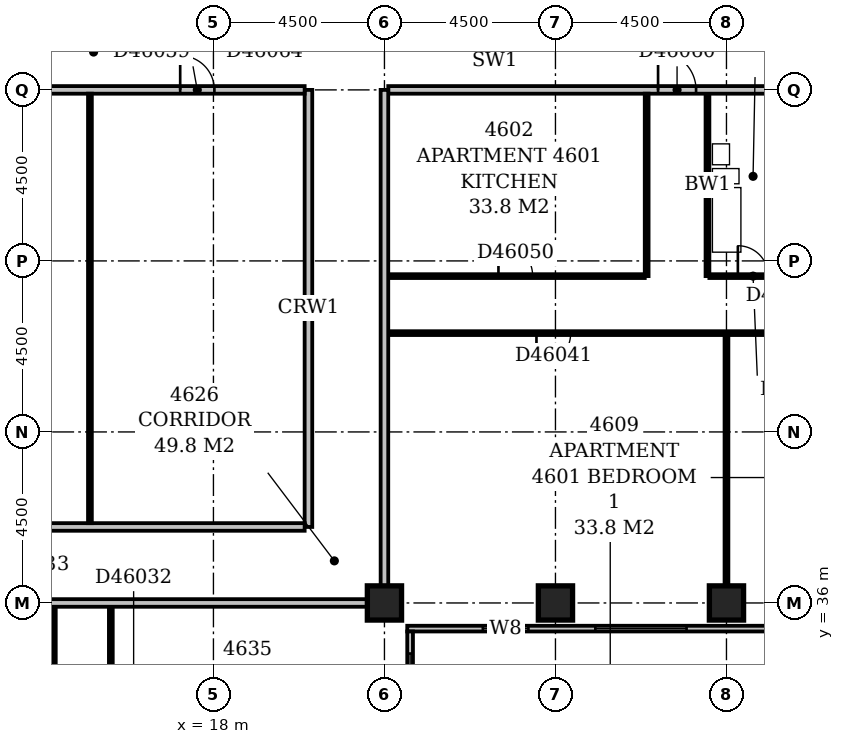
"""IFC4 building model, lengths in metres.
Left out: names, types, materials, properties, quantities, classifications, styles, units other than length and angle.
Written with IfcOpenShell. Run it as: python <this file> out.ifc"""

import sys

from ifc_helpers import new_model, si_unit, direction, frame, frame_2d, origin, origin_2d, place, context, subcontext, project, spatial, rectangle, extrude, element, fill, save


model = new_model("IFC4")
c1 = context("Model", 3, precision=1e-05, world=origin(), true_north=direction((0.0, 1.0)))
c2 = subcontext(c1, "Body", "Model", "MODEL_VIEW")
j1 = project(units=[si_unit("LENGTHUNIT", "METRE"), si_unit("PLANEANGLEUNIT", "RADIAN")], contexts=[c1])
p1 = place(None, origin())
s1 = spatial("IfcSite", under=j1, at=p1, CompositionType="ELEMENT")
p2 = place(p1, origin())
s2 = spatial("IfcBuilding", under=s1, at=p2, CompositionType="ELEMENT")
p3 = place(p2, frame((0.0, 0.0, 182.6)))
s3 = spatial("IfcBuildingStorey", under=s2, at=p3, CompositionType="ELEMENT", Elevation=182.6)
for number, where, z_axis, x_axis in (
    (1, (22.5, 36.0, -0.3), (0.0, 0.0, 1.0), (1.0, 0.0, 0.0)),
    (2, (27.0, 36.0, -0.3), (0.0, 0.0, 1.0), (1.0, 0.0, 0.0)),
    (3, (31.5, 36.0, -0.3), (0.0, 0.0, 1.0), (1.0, 0.0, 0.0)),
):
    element("IfcColumn", number, at=place(p3, frame(where, z_axis=z_axis, x_axis=x_axis)), inside=s3, PredefinedType="COLUMN", context=c2, shape_type="SweptSolid", body=[
        extrude(rectangle(XDim=0.9, YDim=0.9, at=origin_2d()), origin(), (0.0, 0.0, 1.0), 3.55),
    ])
p4 = place(p3, frame((23.175, 17.4, 0.0), z_axis=(0.0, 0.0, 1.0), x_axis=(0.0, 1.0, 0.0)))
e4 = element("IfcWall", 4, at=p4, inside=s3, PredefinedType="STANDARD", context=c2, shape_type="SweptSolid", body=[
    extrude(rectangle(XDim=17.85, YDim=0.15, at=frame_2d((8.925, 0.0))), origin(), (0.0, 0.0, 1.0), 2.7),
])
p5 = place(p4, frame((2.802, 0.0, 0.6)))
e5 = element("IfcOpeningElement", 5, at=p5, cuts=e4, PredefinedType="OPENING", context=c2, shape_type="SweptSolid", body=[
    extrude(rectangle(XDim=1.5, YDim=1.8, at=frame_2d((0.75, 0.9))), frame((0.0, 0.087, 0.0), z_axis=(0.0, -1.0, 0.0), x_axis=(1.0, 0.0, 0.0)), (0.0, 0.0, 1.0), 0.174),
])
p6 = place(p4, frame((6.15, 0.0, 0.6)))
e6 = element("IfcOpeningElement", 6, at=p6, cuts=e4, PredefinedType="OPENING", context=c2, shape_type="SweptSolid", body=[
    extrude(rectangle(XDim=2.4, YDim=1.8, at=frame_2d((1.2, 0.9))), frame((0.0, 0.087, 0.0), z_axis=(0.0, -1.0, 0.0), x_axis=(1.0, 0.0, 0.0)), (0.0, 0.0, 1.0), 0.174),
])
p7 = place(p4, frame((10.65, 0.0, 0.6)))
e7 = element("IfcOpeningElement", 7, at=p7, cuts=e4, PredefinedType="OPENING", context=c2, shape_type="SweptSolid", body=[
    extrude(rectangle(XDim=2.4, YDim=1.8, at=frame_2d((1.2, 0.9))), frame((0.0, 0.087, 0.0), z_axis=(0.0, -1.0, 0.0), x_axis=(1.0, 0.0, 0.0)), (0.0, 0.0, 1.0), 0.174),
])
p8 = place(p4, frame((14.869, 0.0, 0.6)))
e8 = element("IfcOpeningElement", 8, at=p8, cuts=e4, PredefinedType="OPENING", context=c2, shape_type="SweptSolid", body=[
    extrude(rectangle(XDim=2.4, YDim=1.8, at=frame_2d((1.2, 0.9))), frame((0.0, 0.087, 0.0), z_axis=(0.0, -1.0, 0.0), x_axis=(1.0, 0.0, 0.0)), (0.0, 0.0, 1.0), 0.174),
])
p9 = place(p3, frame((23.1, 35.325, 0.0), z_axis=(0.0, 0.0, 1.0), x_axis=(1.0, 0.0, 0.0)))
e9 = element("IfcWall", 9, at=p9, inside=s3, PredefinedType="STANDARD", context=c2, shape_type="SweptSolid", body=[
    extrude(rectangle(XDim=45.15, YDim=0.15, at=frame_2d((22.575, 0.0))), origin(), (0.0, 0.0, 1.0), 2.7),
])
p10 = place(p9, frame((1.989, 0.0, 0.6)))
e10 = element("IfcOpeningElement", 10, at=p10, cuts=e9, PredefinedType="OPENING", context=c2, shape_type="SweptSolid", body=[
    extrude(rectangle(XDim=1.2, YDim=1.8, at=frame_2d((0.6, 0.9))), frame((0.0, 0.087, 0.0), z_axis=(0.0, -1.0, 0.0), x_axis=(1.0, 0.0, 0.0)), (0.0, 0.0, 1.0), 0.174),
])
p11 = place(p9, frame((4.95, 0.0, 0.6)))
e11 = element("IfcOpeningElement", 11, at=p11, cuts=e9, PredefinedType="OPENING", context=c2, shape_type="SweptSolid", body=[
    extrude(rectangle(XDim=2.4, YDim=1.8, at=frame_2d((1.2, 0.9))), frame((0.0, 0.087, 0.0), z_axis=(0.0, -1.0, 0.0), x_axis=(1.0, 0.0, 0.0)), (0.0, 0.0, 1.0), 0.174),
])
p12 = place(p9, frame((9.45, 0.0, 0.6)))
e12 = element("IfcOpeningElement", 12, at=p12, cuts=e9, PredefinedType="OPENING", context=c2, shape_type="SweptSolid", body=[
    extrude(rectangle(XDim=2.4, YDim=1.8, at=frame_2d((1.2, 0.9))), frame((0.0, 0.087, 0.0), z_axis=(0.0, -1.0, 0.0), x_axis=(1.0, 0.0, 0.0)), (0.0, 0.0, 1.0), 0.174),
])
p13 = place(p9, frame((13.95, 0.0, 0.6)))
e13 = element("IfcOpeningElement", 13, at=p13, cuts=e9, PredefinedType="OPENING", context=c2, shape_type="SweptSolid", body=[
    extrude(rectangle(XDim=2.4, YDim=1.8, at=frame_2d((1.2, 0.9))), frame((0.0, 0.087, 0.0), z_axis=(0.0, -1.0, 0.0), x_axis=(1.0, 0.0, 0.0)), (0.0, 0.0, 1.0), 0.174),
])
p14 = place(p9, frame((18.45, 0.0, 0.6)))
e14 = element("IfcOpeningElement", 14, at=p14, cuts=e9, PredefinedType="OPENING", context=c2, shape_type="SweptSolid", body=[
    extrude(rectangle(XDim=2.4, YDim=1.8, at=frame_2d((1.2, 0.9))), frame((0.0, 0.087, 0.0), z_axis=(0.0, -1.0, 0.0), x_axis=(1.0, 0.0, 0.0)), (0.0, 0.0, 1.0), 0.174),
])
p15 = place(p9, frame((22.589, 0.0, 0.6)))
e15 = element("IfcOpeningElement", 15, at=p15, cuts=e9, PredefinedType="OPENING", context=c2, shape_type="SweptSolid", body=[
    extrude(rectangle(XDim=2.1, YDim=1.8, at=frame_2d((1.05, 0.9))), frame((0.0, 0.087, 0.0), z_axis=(0.0, -1.0, 0.0), x_axis=(1.0, 0.0, 0.0)), (0.0, 0.0, 1.0), 0.174),
])
p16 = place(p9, frame((28.653, 0.0, 0.6)))
e16 = element("IfcOpeningElement", 16, at=p16, cuts=e9, PredefinedType="OPENING", context=c2, shape_type="SweptSolid", body=[
    extrude(rectangle(XDim=1.5, YDim=1.8, at=frame_2d((0.75, 0.9))), frame((0.0, 0.087, 0.0), z_axis=(0.0, -1.0, 0.0), x_axis=(1.0, 0.0, 0.0)), (0.0, 0.0, 1.0), 0.174),
])
p17 = place(p9, frame((31.95, 0.0, 0.6)))
e17 = element("IfcOpeningElement", 17, at=p17, cuts=e9, PredefinedType="OPENING", context=c2, shape_type="SweptSolid", body=[
    extrude(rectangle(XDim=2.4, YDim=1.8, at=frame_2d((1.2, 0.9))), frame((0.0, 0.087, 0.0), z_axis=(0.0, -1.0, 0.0), x_axis=(1.0, 0.0, 0.0)), (0.0, 0.0, 1.0), 0.174),
])
p18 = place(p9, frame((36.45, 0.0, 0.6)))
e18 = element("IfcOpeningElement", 18, at=p18, cuts=e9, PredefinedType="OPENING", context=c2, shape_type="SweptSolid", body=[
    extrude(rectangle(XDim=2.4, YDim=1.8, at=frame_2d((1.2, 0.9))), frame((0.0, 0.087, 0.0), z_axis=(0.0, -1.0, 0.0), x_axis=(1.0, 0.0, 0.0)), (0.0, 0.0, 1.0), 0.174),
])
p19 = place(p9, frame((40.95, 0.0, 0.6)))
e19 = element("IfcOpeningElement", 19, at=p19, cuts=e9, PredefinedType="OPENING", context=c2, shape_type="SweptSolid", body=[
    extrude(rectangle(XDim=2.4, YDim=1.8, at=frame_2d((1.2, 0.9))), frame((0.0, 0.087, 0.0), z_axis=(0.0, -1.0, 0.0), x_axis=(1.0, 0.0, 0.0)), (0.0, 0.0, 1.0), 0.174),
])
p20 = place(p3, frame((15.3, 22.6, 0.0), z_axis=(0.0, 0.0, 1.0), x_axis=(0.0, 1.0, 0.0)))
e20 = element("IfcWall", 20, at=p20, inside=s3, PredefinedType="PARTITIONING", context=c2, shape_type="SweptSolid", body=[
    extrude(rectangle(XDim=13.3, YDim=0.1, at=frame_2d((6.65, 0.0))), origin(), (0.0, 0.0, 1.0), 3.25),
])
p21 = place(p20, frame((1.7, 0.0, 0.0)))
e21 = element("IfcOpeningElement", 21, at=p21, cuts=e20, PredefinedType="OPENING", context=c2, shape_type="SweptSolid", body=[
    extrude(rectangle(XDim=0.9, YDim=2.1, at=frame_2d((0.45, 1.05))), frame((0.0, 0.062, 0.0), z_axis=(0.0, -1.0, 0.0), x_axis=(1.0, 0.0, 0.0)), (0.0, 0.0, 1.0), 0.124),
])
p22 = place(p20, frame((6.2, 0.0, 0.0)))
e22 = element("IfcOpeningElement", 22, at=p22, cuts=e20, PredefinedType="OPENING", context=c2, shape_type="SweptSolid", body=[
    extrude(rectangle(XDim=0.9, YDim=2.1, at=frame_2d((0.45, 1.05))), frame((0.0, 0.062, 0.0), z_axis=(0.0, -1.0, 0.0), x_axis=(1.0, 0.0, 0.0)), (0.0, 0.0, 1.0), 0.124),
])
p23 = place(p20, frame((10.7, 0.0, 0.0)))
e23 = element("IfcOpeningElement", 23, at=p23, cuts=e20, PredefinedType="OPENING", context=c2, shape_type="SweptSolid", body=[
    extrude(rectangle(XDim=0.9, YDim=2.1, at=frame_2d((0.45, 1.05))), frame((0.0, 0.062, 0.0), z_axis=(0.0, -1.0, 0.0), x_axis=(1.0, 0.0, 0.0)), (0.0, 0.0, 1.0), 0.124),
])
p24 = place(p3, frame((13.8, 24.1, 0.0), z_axis=(0.0, 0.0, 1.0), x_axis=(0.0, 1.0, 0.0)))
e24 = element("IfcWall", 24, at=p24, inside=s3, PredefinedType="PARTITIONING", context=c2, shape_type="SweptSolid", body=[
    extrude(rectangle(XDim=11.8, YDim=0.1, at=frame_2d((5.9, 0.0))), origin(), (0.0, 0.0, 1.0), 3.25),
])
p25 = place(p24, frame((8.7, 0.0, 0.0)))
e25 = element("IfcOpeningElement", 25, at=p25, cuts=e24, PredefinedType="OPENING", context=c2, shape_type="SweptSolid", body=[
    extrude(rectangle(XDim=0.8, YDim=2.1, at=frame_2d((0.4, 1.05))), frame((0.0, 0.062, 0.0), z_axis=(0.0, -1.0, 0.0), x_axis=(1.0, 0.0, 0.0)), (0.0, 0.0, 1.0), 0.124),
])
p26 = place(p24, frame((3.5, 0.0, 0.0)))
e26 = element("IfcOpeningElement", 26, at=p26, cuts=e24, PredefinedType="OPENING", context=c2, shape_type="SweptSolid", body=[
    extrude(rectangle(XDim=0.9, YDim=2.1, at=frame_2d((0.45, 1.05))), frame((0.0, 0.062, 0.0), z_axis=(0.0, -1.0, 0.0), x_axis=(1.0, 0.0, 0.0)), (0.0, 0.0, 1.0), 0.124),
])
p27 = place(p24, frame((10.7, 0.0, 0.0)))
e27 = element("IfcOpeningElement", 27, at=p27, cuts=e24, PredefinedType="OPENING", context=c2, shape_type="SweptSolid", body=[
    extrude(rectangle(XDim=0.8, YDim=2.1, at=frame_2d((0.4, 1.05))), frame((0.0, 0.062, 0.0), z_axis=(0.0, -1.0, 0.0), x_axis=(1.0, 0.0, 0.0)), (0.0, 0.0, 1.0), 0.124),
])
p28 = place(p3, frame((9.1, 36.0, 0.0), z_axis=(0.0, 0.0, 1.0), x_axis=(1.0, 0.0, 0.0)))
e28 = element("IfcWall", 28, at=p28, inside=s3, PredefinedType="PARTITIONING", context=c2, shape_type="SweptSolid", body=[
    extrude(rectangle(XDim=12.95, YDim=0.2, at=frame_2d((6.475, 0.0))), origin(), (0.0, 0.0, 1.0), 3.25),
])
p29 = place(p3, frame((22.5, 36.45, 0.0), z_axis=(0.0, 0.0, 1.0), x_axis=(0.0, 1.0, 0.0)))
e29 = element("IfcWall", 29, at=p29, inside=s3, PredefinedType="PARTITIONING", context=c2, shape_type="SweptSolid", body=[
    extrude(rectangle(XDim=13.05, YDim=0.2, at=frame_2d((6.525, 0.0))), origin(), (0.0, 0.0, 1.0), 3.25),
])
p30 = place(p3, frame((31.5, 36.45, 0.0), z_axis=(0.0, 0.0, 1.0), x_axis=(0.0, 1.0, 0.0)))
e30 = element("IfcWall", 30, at=p30, inside=s3, PredefinedType="PARTITIONING", context=c2, shape_type="SweptSolid", body=[
    extrude(rectangle(XDim=6.6, YDim=0.1, at=frame_2d((3.3, 0.0))), origin(), (0.0, 0.0, 1.0), 3.25),
])
p31 = place(p3, frame((9.1, 38.0, 0.0), z_axis=(0.0, 0.0, 1.0), x_axis=(1.0, 0.0, 0.0)))
e31 = element("IfcWall", 31, at=p31, inside=s3, PredefinedType="PARTITIONING", context=c2, shape_type="SweptSolid", body=[
    extrude(rectangle(XDim=11.3, YDim=0.2, at=frame_2d((5.65, 0.0))), origin(), (0.0, 0.0, 1.0), 3.25),
])
p32 = place(p3, frame((20.5, 38.0, 0.0), z_axis=(0.0, 0.0, 1.0), x_axis=(0.0, 1.0, 0.0)))
e32 = element("IfcWall", 32, at=p32, inside=s3, PredefinedType="PARTITIONING", context=c2, shape_type="SweptSolid", body=[
    extrude(rectangle(XDim=11.5, YDim=0.2, at=frame_2d((5.75, 0.0))), origin(), (0.0, 0.0, 1.0), 3.25),
])
p33 = place(p3, frame((14.75, 38.1, 0.0), z_axis=(0.0, 0.0, 1.0), x_axis=(0.0, 1.0, 0.0)))
e33 = element("IfcWall", 33, at=p33, inside=s3, PredefinedType="PARTITIONING", context=c2, shape_type="SweptSolid", body=[
    extrude(rectangle(XDim=11.3, YDim=0.1, at=frame_2d((5.65, 0.0))), origin(), (0.0, 0.0, 1.0), 3.25),
])
p34 = place(p3, frame((22.6, 43.1, 0.0), z_axis=(0.0, 0.0, 1.0), x_axis=(1.0, 0.0, 0.0)))
e34 = element("IfcWall", 34, at=p34, inside=s3, PredefinedType="PARTITIONING", context=c2, shape_type="SweptSolid", body=[
    extrude(rectangle(XDim=17.8, YDim=0.1, at=frame_2d((8.9, 0.0))), origin(), (0.0, 0.0, 1.0), 3.25),
])
p35 = place(p34, frame((3.9, 0.0, 0.0)))
e35 = element("IfcOpeningElement", 35, at=p35, cuts=e34, PredefinedType="OPENING", context=c2, shape_type="SweptSolid", body=[
    extrude(rectangle(XDim=0.9, YDim=2.1, at=frame_2d((0.45, 1.05))), frame((0.0, 0.062, 0.0), z_axis=(0.0, -1.0, 0.0), x_axis=(1.0, 0.0, 0.0)), (0.0, 0.0, 1.0), 0.124),
])
p36 = place(p34, frame((10.7, 0.0, 0.0)))
e36 = element("IfcOpeningElement", 36, at=p36, cuts=e34, PredefinedType="OPENING", context=c2, shape_type="SweptSolid", body=[
    extrude(rectangle(XDim=0.9, YDim=2.1, at=frame_2d((0.45, 1.05))), frame((0.0, 0.062, 0.0), z_axis=(0.0, -1.0, 0.0), x_axis=(1.0, 0.0, 0.0)), (0.0, 0.0, 1.0), 0.124),
])
p37 = place(p34, frame((14.05, 0.0, 0.0)))
e37 = element("IfcOpeningElement", 37, at=p37, cuts=e34, PredefinedType="OPENING", context=c2, shape_type="SweptSolid", body=[
    extrude(rectangle(XDim=0.9, YDim=2.1, at=frame_2d((0.45, 1.05))), frame((0.0, 0.062, 0.0), z_axis=(0.0, -1.0, 0.0), x_axis=(1.0, 0.0, 0.0)), (0.0, 0.0, 1.0), 0.124),
])
p38 = place(p3, frame((22.6, 44.6, 0.0), z_axis=(0.0, 0.0, 1.0), x_axis=(1.0, 0.0, 0.0)))
e38 = element("IfcWall", 38, at=p38, inside=s3, PredefinedType="PARTITIONING", context=c2, shape_type="SweptSolid", body=[
    extrude(rectangle(XDim=6.75, YDim=0.1, at=frame_2d((3.375, 0.0))), origin(), (0.0, 0.0, 1.0), 3.25),
])
p39 = place(p38, frame((2.9, 0.0, 0.0)))
e39 = element("IfcOpeningElement", 39, at=p39, cuts=e38, PredefinedType="OPENING", context=c2, shape_type="SweptSolid", body=[
    extrude(rectangle(XDim=0.9, YDim=2.1, at=frame_2d((0.45, 1.05))), frame((0.0, 0.062, 0.0), z_axis=(0.0, -1.0, 0.0), x_axis=(1.0, 0.0, 0.0)), (0.0, 0.0, 1.0), 0.124),
])
p40 = place(p3, frame((29.4, 44.6, 0.0), z_axis=(0.0, 0.0, 1.0), x_axis=(0.0, 1.0, 0.0)))
e40 = element("IfcWall", 40, at=p40, inside=s3, PredefinedType="PARTITIONING", context=c2, shape_type="SweptSolid", body=[
    extrude(rectangle(XDim=4.8, YDim=0.1, at=frame_2d((2.4, 0.0))), origin(), (0.0, 0.0, 1.0), 3.25),
])
p41 = place(p3, frame((31.0, 44.6, 0.0), z_axis=(0.0, 0.0, 1.0), x_axis=(0.0, 1.0, 0.0)))
e41 = element("IfcWall", 41, at=p41, inside=s3, PredefinedType="PLUMBINGWALL", context=c2, shape_type="SweptSolid", body=[
    extrude(rectangle(XDim=4.8, YDim=0.1, at=frame_2d((2.4, 0.0))), origin(), (0.0, 0.0, 1.0), 3.25),
])
p42 = place(p3, frame((31.05, 44.6, 0.0), z_axis=(0.0, 0.0, 1.0), x_axis=(1.0, 0.0, 0.0)))
e42 = element("IfcWall", 42, at=p42, inside=s3, PredefinedType="PARTITIONING", context=c2, shape_type="SweptSolid", body=[
    extrude(rectangle(XDim=9.35, YDim=0.1, at=frame_2d((4.675, 0.0))), origin(), (0.0, 0.0, 1.0), 3.25),
])
p43 = place(p42, frame((0.75, 0.0, 0.0)))
e43 = element("IfcOpeningElement", 43, at=p43, cuts=e42, PredefinedType="OPENING", context=c2, shape_type="SweptSolid", body=[
    extrude(rectangle(XDim=0.8, YDim=2.1, at=frame_2d((0.4, 1.05))), frame((0.0, 0.062, 0.0), z_axis=(0.0, -1.0, 0.0), x_axis=(1.0, 0.0, 0.0)), (0.0, 0.0, 1.0), 0.124),
])
p44 = place(p42, frame((8.05, 0.0, 0.0)))
e44 = element("IfcOpeningElement", 44, at=p44, cuts=e42, PredefinedType="OPENING", context=c2, shape_type="SweptSolid", body=[
    extrude(rectangle(XDim=0.8, YDim=2.1, at=frame_2d((0.4, 1.05))), frame((0.0, 0.062, 0.0), z_axis=(0.0, -1.0, 0.0), x_axis=(1.0, 0.0, 0.0)), (0.0, 0.0, 1.0), 0.124),
])
p45 = place(p42, frame((4.25, 0.0, 0.0)))
e45 = element("IfcOpeningElement", 45, at=p45, cuts=e42, PredefinedType="OPENING", context=c2, shape_type="SweptSolid", body=[
    extrude(rectangle(XDim=0.8, YDim=2.1, at=frame_2d((0.4, 1.05))), frame((0.0, 0.062, 0.0), z_axis=(0.0, -1.0, 0.0), x_axis=(1.0, 0.0, 0.0)), (0.0, 0.0, 1.0), 0.124),
])
p46 = place(p42, frame((6.05, 0.0, 0.0)))
e46 = element("IfcOpeningElement", 46, at=p46, cuts=e42, PredefinedType="OPENING", context=c2, shape_type="SweptSolid", body=[
    extrude(rectangle(XDim=0.8, YDim=2.1, at=frame_2d((0.4, 1.05))), frame((0.0, 0.062, 0.0), z_axis=(0.0, -1.0, 0.0), x_axis=(1.0, 0.0, 0.0)), (0.0, 0.0, 1.0), 0.124),
])
p47 = place(p42, frame((2.7, 0.0, 0.0)))
e47 = element("IfcOpeningElement", 47, at=p47, cuts=e42, PredefinedType="OPENING", context=c2, shape_type="SweptSolid", body=[
    extrude(rectangle(XDim=0.8, YDim=2.1, at=frame_2d((0.4, 1.05))), frame((0.0, 0.062, 0.0), z_axis=(0.0, -1.0, 0.0), x_axis=(1.0, 0.0, 0.0)), (0.0, 0.0, 1.0), 0.124),
])
p48 = place(p3, frame((9.1, 49.5, 0.0), z_axis=(0.0, 0.0, 1.0), x_axis=(1.0, 0.0, 0.0)))
e48 = element("IfcWall", 48, at=p48, inside=s3, PredefinedType="PARTITIONING", context=c2, shape_type="SweptSolid", body=[
    extrude(rectangle(XDim=11.3, YDim=0.2, at=frame_2d((5.65, 0.0))), origin(), (0.0, 0.0, 1.0), 3.25),
])
p49 = place(p48, frame((8.025, 0.0, 0.0)))
e49 = element("IfcOpeningElement", 49, at=p49, cuts=e48, PredefinedType="OPENING", context=c2, shape_type="SweptSolid", body=[
    extrude(rectangle(XDim=0.9, YDim=2.1, at=frame_2d((0.45, 1.05))), frame((0.0, 0.112, 0.0), z_axis=(0.0, -1.0, 0.0), x_axis=(1.0, 0.0, 0.0)), (0.0, 0.0, 1.0), 0.224),
])
p50 = place(p3, frame((22.6, 49.5, 0.0), z_axis=(0.0, 0.0, 1.0), x_axis=(1.0, 0.0, 0.0)))
e50 = element("IfcWall", 50, at=p50, inside=s3, PredefinedType="PARTITIONING", context=c2, shape_type="SweptSolid", body=[
    extrude(rectangle(XDim=44.45, YDim=0.2, at=frame_2d((22.225, 0.0))), origin(), (0.0, 0.0, 1.0), 3.25),
])
p51 = place(p50, frame((7.1, 0.0, 0.0)))
e51 = element("IfcOpeningElement", 51, at=p51, cuts=e50, PredefinedType="OPENING", context=c2, shape_type="SweptSolid", body=[
    extrude(rectangle(XDim=1.0, YDim=2.1, at=frame_2d((0.5, 1.05))), frame((0.0, 0.112, 0.0), z_axis=(0.0, -1.0, 0.0), x_axis=(1.0, 0.0, 0.0)), (0.0, 0.0, 1.0), 0.224),
])
p52 = place(p50, frame((26.1, 0.0, 0.0)))
e52 = element("IfcOpeningElement", 52, at=p52, cuts=e50, PredefinedType="OPENING", context=c2, shape_type="SweptSolid", body=[
    extrude(rectangle(XDim=1.0, YDim=2.1, at=frame_2d((0.5, 1.05))), frame((0.0, 0.112, 0.0), z_axis=(0.0, -1.0, 0.0), x_axis=(1.0, 0.0, 0.0)), (0.0, 0.0, 1.0), 0.224),
])
p53 = place(p50, frame((31.8, 0.0, 0.0)))
e53 = element("IfcOpeningElement", 53, at=p53, cuts=e50, PredefinedType="OPENING", context=c2, shape_type="SweptSolid", body=[
    extrude(rectangle(XDim=1.0, YDim=2.1, at=frame_2d((0.5, 1.05))), frame((0.0, 0.112, 0.0), z_axis=(0.0, -1.0, 0.0), x_axis=(1.0, 0.0, 0.0)), (0.0, 0.0, 1.0), 0.224),
])
p54 = place(p8, origin())
e54 = element("IfcWindow", 54, at=p54, inside=s3, PartitioningType="SINGLE_PANEL", PredefinedType="WINDOW", context=c2, shape_type="SweptSolid", body=[
    extrude(rectangle(XDim=2.4, YDim=1.8, at=frame_2d((1.2, 0.9))), frame((0.0, 0.03, 0.0), z_axis=(0.0, -1.0, 0.0), x_axis=(1.0, 0.0, 0.0)), (0.0, 0.0, 1.0), 0.06),
])
fill(e8, e54)
p55 = place(p10, origin())
e55 = element("IfcWindow", 55, at=p55, inside=s3, PartitioningType="SINGLE_PANEL", PredefinedType="WINDOW", context=c2, shape_type="SweptSolid", body=[
    extrude(rectangle(XDim=1.2, YDim=1.8, at=frame_2d((0.6, 0.9))), frame((0.0, 0.03, 0.0), z_axis=(0.0, -1.0, 0.0), x_axis=(1.0, 0.0, 0.0)), (0.0, 0.0, 1.0), 0.06),
])
fill(e10, e55)
p56 = place(p11, origin())
e56 = element("IfcWindow", 56, at=p56, inside=s3, PartitioningType="SINGLE_PANEL", PredefinedType="WINDOW", context=c2, shape_type="SweptSolid", body=[
    extrude(rectangle(XDim=2.4, YDim=1.8, at=frame_2d((1.2, 0.9))), frame((0.0, 0.03, 0.0), z_axis=(0.0, -1.0, 0.0), x_axis=(1.0, 0.0, 0.0)), (0.0, 0.0, 1.0), 0.06),
])
fill(e11, e56)
p57 = place(p27, origin())
e57 = element("IfcDoor", 57, at=p57, inside=s3, OperationType="SINGLE_SWING_LEFT", PredefinedType="DOOR", context=c2, shape_type="SweptSolid", body=[
    extrude(rectangle(XDim=0.8, YDim=2.1, at=frame_2d((0.4, 1.05))), frame((0.0, 0.025, 0.0), z_axis=(0.0, -1.0, 0.0), x_axis=(1.0, 0.0, 0.0)), (0.0, 0.0, 1.0), 0.05),
])
fill(e27, e57)
p58 = place(p35, frame((0.9, 0.0, 0.0), z_axis=(0.0, 0.0, 1.0), x_axis=(-1.0, 0.0, 0.0)))
e58 = element("IfcDoor", 58, at=p58, inside=s3, OperationType="SINGLE_SWING_RIGHT", PredefinedType="DOOR", context=c2, shape_type="SweptSolid", body=[
    extrude(rectangle(XDim=0.9, YDim=2.1, at=frame_2d((0.45, 1.05))), frame((0.0, 0.025, 0.0), z_axis=(0.0, -1.0, 0.0), x_axis=(1.0, 0.0, 0.0)), (0.0, 0.0, 1.0), 0.05),
])
fill(e35, e58)
p59 = place(p39, origin())
e59 = element("IfcDoor", 59, at=p59, inside=s3, OperationType="SINGLE_SWING_LEFT", PredefinedType="DOOR", context=c2, shape_type="SweptSolid", body=[
    extrude(rectangle(XDim=0.9, YDim=2.1, at=frame_2d((0.45, 1.05))), frame((0.0, 0.025, 0.0), z_axis=(0.0, -1.0, 0.0), x_axis=(1.0, 0.0, 0.0)), (0.0, 0.0, 1.0), 0.05),
])
fill(e39, e59)
p60 = place(p43, origin())
e60 = element("IfcDoor", 60, at=p60, inside=s3, OperationType="SINGLE_SWING_LEFT", PredefinedType="DOOR", context=c2, shape_type="SweptSolid", body=[
    extrude(rectangle(XDim=0.8, YDim=2.1, at=frame_2d((0.4, 1.05))), frame((0.0, 0.025, 0.0), z_axis=(0.0, -1.0, 0.0), x_axis=(1.0, 0.0, 0.0)), (0.0, 0.0, 1.0), 0.05),
])
fill(e43, e60)
p61 = place(p49, origin())
e61 = element("IfcDoor", 61, at=p61, inside=s3, OperationType="SINGLE_SWING_LEFT", PredefinedType="DOOR", context=c2, shape_type="SweptSolid", body=[
    extrude(rectangle(XDim=0.9, YDim=2.1, at=frame_2d((0.45, 1.05))), frame((0.0, 0.025, 0.0), z_axis=(0.0, -1.0, 0.0), x_axis=(1.0, 0.0, 0.0)), (0.0, 0.0, 1.0), 0.05),
])
fill(e49, e61)
p62 = place(p51, origin())
e62 = element("IfcDoor", 62, at=p62, inside=s3, OperationType="SINGLE_SWING_LEFT", PredefinedType="DOOR", context=c2, shape_type="SweptSolid", body=[
    extrude(rectangle(XDim=1.0, YDim=2.1, at=frame_2d((0.5, 1.05))), frame((0.0, 0.025, 0.0), z_axis=(0.0, -1.0, 0.0), x_axis=(1.0, 0.0, 0.0)), (0.0, 0.0, 1.0), 0.05),
])
fill(e51, e62)
save(model, sys.argv[1])
